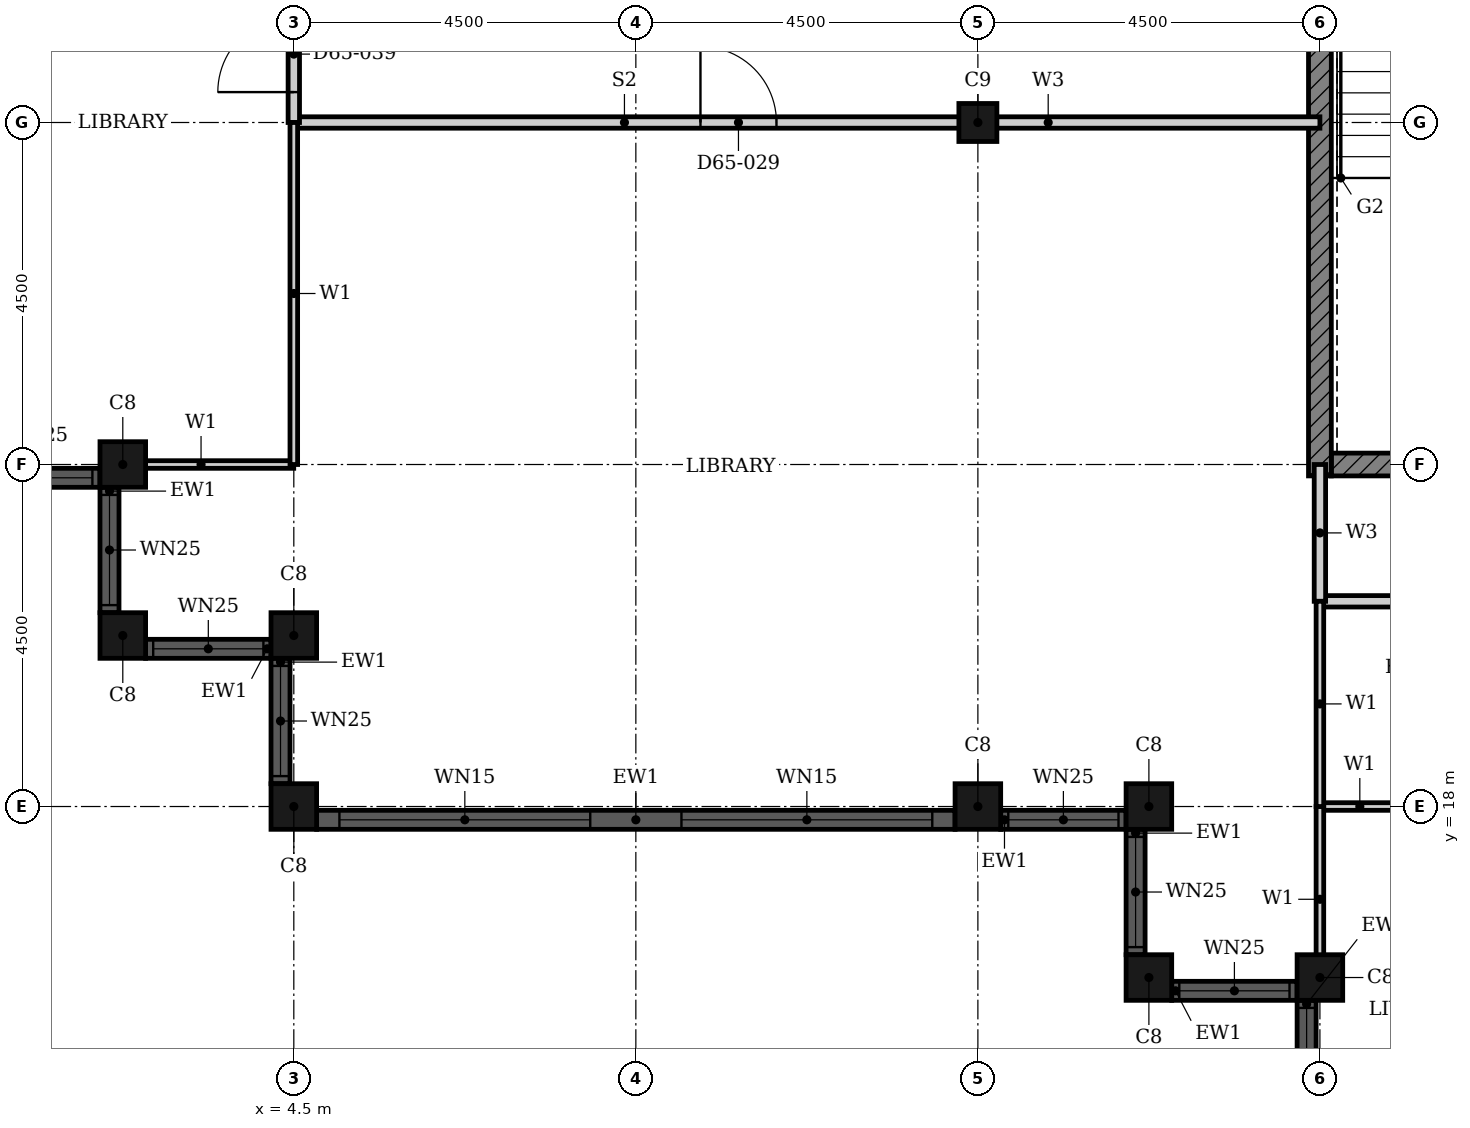
"""IFC4 building model, lengths in metres.
Left out: names, types, materials, properties, quantities, classifications, styles, units other than length and angle.
Written with IfcOpenShell. Run it as: python <this file> out.ifc"""

import sys

from ifc_helpers import new_model, si_unit, direction, frame, frame_2d, origin, origin_2d, place, context, subcontext, project, spatial, rectangle, hollow_rectangle, extrude, element, fill, save


model = new_model("IFC4")
c1 = context("Model", 3, precision=1e-05, world=origin(), true_north=direction((0.0, 1.0)))
c2 = subcontext(c1, "Body", "Model", "MODEL_VIEW")
j1 = project(units=[si_unit("LENGTHUNIT", "METRE"), si_unit("PLANEANGLEUNIT", "RADIAN")], contexts=[c1])
p1 = place(None, origin())
s1 = spatial("IfcSite", under=j1, at=p1, CompositionType="ELEMENT")
p2 = place(p1, origin())
s2 = spatial("IfcBuilding", under=s1, at=p2, CompositionType="ELEMENT")
p3 = place(p2, frame((0.0, 0.0, 256.4)))
s3 = spatial("IfcBuildingStorey", under=s2, at=p3, CompositionType="ELEMENT", Elevation=256.4)
for number, where, z_axis, x_axis in (
    (1, (15.75, 18.0, 0.0), (0.0, 0.0, 1.0), (1.0, 0.0, 0.0)),
    (2, (15.75, 15.75, 0.0), (0.0, 0.0, 1.0), (1.0, 0.0, 0.0)),
    (3, (18.0, 15.75, 0.0), (0.0, 0.0, 1.0), (1.0, 0.0, 0.0)),
    (4, (2.25, 22.5, 0.0), (0.0, 0.0, 1.0), (1.0, 0.0, 0.0)),
    (5, (2.25, 20.25, 0.0), (0.0, 0.0, 1.0), (1.0, 0.0, 0.0)),
    (6, (4.5, 20.25, 0.0), (0.0, 0.0, 1.0), (1.0, 0.0, 0.0)),
    (7, (4.5, 18.0, 0.0), (0.0, 0.0, 1.0), (1.0, 0.0, 0.0)),
    (8, (13.5, 18.0, 0.0), (0.0, 0.0, 1.0), (1.0, 0.0, 0.0)),
):
    element("IfcColumn", number, at=place(p3, frame(where, z_axis=z_axis, x_axis=x_axis)), inside=s3, PredefinedType="COLUMN", context=c2, shape_type="SweptSolid", body=[
        extrude(hollow_rectangle(XDim=0.6, YDim=0.6, WallThickness=0.02, at=origin_2d()), origin(), (0.0, 0.0, 1.0), 3.7),
    ])
p4 = place(p3, frame((13.5, 27.0, 0.0), z_axis=(0.0, 0.0, 1.0), x_axis=(1.0, 0.0, 0.0)))
e9 = element("IfcColumn", 9, at=p4, inside=s3, PredefinedType="COLUMN", context=c2, shape_type="SweptSolid", body=[
    extrude(hollow_rectangle(XDim=0.5, YDim=0.5, WallThickness=0.016, InnerFilletRadius=0.032, OuterFilletRadius=0.048, at=origin_2d()), origin(), (0.0, 0.0, 1.0), 3.7),
])
p5 = place(p3, frame((15.575, 17.7, 0.0), z_axis=(0.0, 0.0, 1.0), x_axis=(0.0, -1.0, 0.0)))
e10 = element("IfcWall", 10, at=p5, inside=s3, PredefinedType="SOLIDWALL", context=c2, shape_type="SweptSolid", body=[
    extrude(rectangle(XDim=1.65, YDim=0.25, at=frame_2d((0.825, 0.0))), origin(), (0.0, 0.0, 1.0), 3.7),
])
p6 = place(p5, frame((0.1, 0.0, 0.9)))
e11 = element("IfcOpeningElement", 11, at=p6, cuts=e10, PredefinedType="OPENING", context=c2, shape_type="SweptSolid", body=[
    extrude(rectangle(XDim=1.45, YDim=1.85, at=frame_2d((0.725, 0.925))), frame((0.0, 0.135, 0.0), z_axis=(0.0, -1.0, 0.0), x_axis=(1.0, 0.0, 0.0)), (0.0, 0.0, 1.0), 0.27),
])
p7 = place(p3, frame((16.05, 15.575, 0.0), z_axis=(0.0, 0.0, 1.0), x_axis=(1.0, 0.0, 0.0)))
e12 = element("IfcWall", 12, at=p7, inside=s3, PredefinedType="SOLIDWALL", context=c2, shape_type="SweptSolid", body=[
    extrude(rectangle(XDim=1.65, YDim=0.25, at=frame_2d((0.825, 0.0))), origin(), (0.0, 0.0, 1.0), 3.7),
])
p8 = place(p7, frame((0.1, 0.0, 0.9)))
e13 = element("IfcOpeningElement", 13, at=p8, cuts=e12, PredefinedType="OPENING", context=c2, shape_type="SweptSolid", body=[
    extrude(rectangle(XDim=1.45, YDim=1.85, at=frame_2d((0.725, 0.925))), frame((0.0, 0.135, 0.0), z_axis=(0.0, -1.0, 0.0), x_axis=(1.0, 0.0, 0.0)), (0.0, 0.0, 1.0), 0.27),
])
p9 = place(p3, frame((17.825, 15.45, 0.0), z_axis=(0.0, 0.0, 1.0), x_axis=(0.0, -1.0, 0.0)))
e14 = element("IfcWall", 14, at=p9, inside=s3, PredefinedType="SOLIDWALL", context=c2, shape_type="SweptSolid", body=[
    extrude(rectangle(XDim=1.65, YDim=0.25, at=frame_2d((0.825, 0.0))), origin(), (0.0, 0.0, 1.0), 3.7),
])
p10 = place(p9, frame((0.1, 0.0, 0.9)))
e15 = element("IfcOpeningElement", 15, at=p10, cuts=e14, PredefinedType="OPENING", context=c2, shape_type="SweptSolid", body=[
    extrude(rectangle(XDim=1.45, YDim=1.85, at=frame_2d((0.725, 0.925))), frame((0.0, 0.135, 0.0), z_axis=(0.0, -1.0, 0.0), x_axis=(1.0, 0.0, 0.0)), (0.0, 0.0, 1.0), 0.27),
])
p11 = place(p3, frame((0.3, 22.325, 0.0), z_axis=(0.0, 0.0, 1.0), x_axis=(1.0, 0.0, 0.0)))
e16 = element("IfcWall", 16, at=p11, inside=s3, PredefinedType="SOLIDWALL", context=c2, shape_type="SweptSolid", body=[
    extrude(rectangle(XDim=1.65, YDim=0.25, at=frame_2d((0.825, 0.0))), origin(), (0.0, 0.0, 1.0), 3.7),
])
p12 = place(p11, frame((0.1, 0.0, 0.9)))
e17 = element("IfcOpeningElement", 17, at=p12, cuts=e16, PredefinedType="OPENING", context=c2, shape_type="SweptSolid", body=[
    extrude(rectangle(XDim=1.45, YDim=1.85, at=frame_2d((0.725, 0.925))), frame((0.0, 0.135, 0.0), z_axis=(0.0, -1.0, 0.0), x_axis=(1.0, 0.0, 0.0)), (0.0, 0.0, 1.0), 0.27),
])
p13 = place(p3, frame((2.075, 22.2, 0.0), z_axis=(0.0, 0.0, 1.0), x_axis=(0.0, -1.0, 0.0)))
e18 = element("IfcWall", 18, at=p13, inside=s3, PredefinedType="SOLIDWALL", context=c2, shape_type="SweptSolid", body=[
    extrude(rectangle(XDim=1.65, YDim=0.25, at=frame_2d((0.825, 0.0))), origin(), (0.0, 0.0, 1.0), 3.7),
])
p14 = place(p13, frame((0.1, 0.0, 0.9)))
e19 = element("IfcOpeningElement", 19, at=p14, cuts=e18, PredefinedType="OPENING", context=c2, shape_type="SweptSolid", body=[
    extrude(rectangle(XDim=1.45, YDim=1.85, at=frame_2d((0.725, 0.925))), frame((0.0, 0.135, 0.0), z_axis=(0.0, -1.0, 0.0), x_axis=(1.0, 0.0, 0.0)), (0.0, 0.0, 1.0), 0.27),
])
p15 = place(p3, frame((2.55, 20.075, 0.0), z_axis=(0.0, 0.0, 1.0), x_axis=(1.0, 0.0, 0.0)))
e20 = element("IfcWall", 20, at=p15, inside=s3, PredefinedType="SOLIDWALL", context=c2, shape_type="SweptSolid", body=[
    extrude(rectangle(XDim=1.65, YDim=0.25, at=frame_2d((0.825, 0.0))), origin(), (0.0, 0.0, 1.0), 3.7),
])
p16 = place(p15, frame((0.1, 0.0, 0.9)))
e21 = element("IfcOpeningElement", 21, at=p16, cuts=e20, PredefinedType="OPENING", context=c2, shape_type="SweptSolid", body=[
    extrude(rectangle(XDim=1.45, YDim=1.85, at=frame_2d((0.725, 0.925))), frame((0.0, 0.135, 0.0), z_axis=(0.0, -1.0, 0.0), x_axis=(1.0, 0.0, 0.0)), (0.0, 0.0, 1.0), 0.27),
])
p17 = place(p3, frame((4.325, 19.95, 0.0), z_axis=(0.0, 0.0, 1.0), x_axis=(0.0, -1.0, 0.0)))
e22 = element("IfcWall", 22, at=p17, inside=s3, PredefinedType="SOLIDWALL", context=c2, shape_type="SweptSolid", body=[
    extrude(rectangle(XDim=1.65, YDim=0.25, at=frame_2d((0.825, 0.0))), origin(), (0.0, 0.0, 1.0), 3.7),
])
p18 = place(p17, frame((0.1, 0.0, 0.9)))
e23 = element("IfcOpeningElement", 23, at=p18, cuts=e22, PredefinedType="OPENING", context=c2, shape_type="SweptSolid", body=[
    extrude(rectangle(XDim=1.45, YDim=1.85, at=frame_2d((0.725, 0.925))), frame((0.0, 0.135, 0.0), z_axis=(0.0, -1.0, 0.0), x_axis=(1.0, 0.0, 0.0)), (0.0, 0.0, 1.0), 0.27),
])
p19 = place(p3, frame((4.8, 17.825, 0.0), z_axis=(0.0, 0.0, 1.0), x_axis=(1.0, 0.0, 0.0)))
e24 = element("IfcWall", 24, at=p19, inside=s3, PredefinedType="SOLIDWALL", context=c2, shape_type="SweptSolid", body=[
    extrude(rectangle(XDim=8.4, YDim=0.25, at=frame_2d((4.2, 0.0))), origin(), (0.0, 0.0, 1.0), 3.7),
])
p20 = place(p19, frame((0.3, 0.0, 0.45)))
e25 = element("IfcOpeningElement", 25, at=p20, cuts=e24, PredefinedType="OPENING", context=c2, shape_type="SweptSolid", body=[
    extrude(rectangle(XDim=3.3, YDim=2.3, at=frame_2d((1.65, 1.15))), frame((0.0, 0.135, 0.0), z_axis=(0.0, -1.0, 0.0), x_axis=(1.0, 0.0, 0.0)), (0.0, 0.0, 1.0), 0.27),
])
p21 = place(p19, frame((4.8, 0.0, 0.45)))
e26 = element("IfcOpeningElement", 26, at=p21, cuts=e24, PredefinedType="OPENING", context=c2, shape_type="SweptSolid", body=[
    extrude(rectangle(XDim=3.3, YDim=2.3, at=frame_2d((1.65, 1.15))), frame((0.0, 0.135, 0.0), z_axis=(0.0, -1.0, 0.0), x_axis=(1.0, 0.0, 0.0)), (0.0, 0.0, 1.0), 0.27),
])
p22 = place(p3, frame((13.8, 17.825, 0.0), z_axis=(0.0, 0.0, 1.0), x_axis=(1.0, 0.0, 0.0)))
e27 = element("IfcWall", 27, at=p22, inside=s3, PredefinedType="SOLIDWALL", context=c2, shape_type="SweptSolid", body=[
    extrude(rectangle(XDim=1.65, YDim=0.25, at=frame_2d((0.825, 0.0))), origin(), (0.0, 0.0, 1.0), 3.7),
])
p23 = place(p22, frame((0.1, 0.0, 0.9)))
e28 = element("IfcOpeningElement", 28, at=p23, cuts=e27, PredefinedType="OPENING", context=c2, shape_type="SweptSolid", body=[
    extrude(rectangle(XDim=1.45, YDim=1.85, at=frame_2d((0.725, 0.925))), frame((0.0, 0.135, 0.0), z_axis=(0.0, -1.0, 0.0), x_axis=(1.0, 0.0, 0.0)), (0.0, 0.0, 1.0), 0.27),
])
p24 = place(p3, frame((18.15, 22.5, 0.0), z_axis=(0.0, 0.0, 1.0), x_axis=(1.0, 0.0, 0.0)))
e29 = element("IfcWall", 29, at=p24, inside=s3, PredefinedType="SHEAR", context=c2, shape_type="SweptSolid", body=[
    extrude(rectangle(XDim=4.225, YDim=0.3, at=frame_2d((2.113, 0.0))), origin(), (0.0, 0.0, 1.0), 3.4),
])
p25 = place(p3, frame((18.0, 22.35, 0.0), z_axis=(0.0, 0.0, 1.0), x_axis=(0.0, 1.0, 0.0)))
e30 = element("IfcWall", 30, at=p25, inside=s3, PredefinedType="SHEAR", context=c2, shape_type="SweptSolid", body=[
    extrude(rectangle(XDim=9.3, YDim=0.3, at=frame_2d((4.65, 0.0))), origin(), (0.0, 0.0, 1.0), 3.4),
])
p26 = place(p3, frame((18.0, 20.7, 0.0), z_axis=(0.0, 0.0, 1.0), x_axis=(1.0, 0.0, 0.0)))
e31 = element("IfcWall", 31, at=p26, inside=s3, PredefinedType="PARTITIONING", context=c2, shape_type="SweptSolid", body=[
    extrude(rectangle(XDim=6.6, YDim=0.15, at=frame_2d((3.3, 0.0))), origin(), (0.0, 0.0, 1.0), 3.4),
])
p27 = place(p26, frame((4.3, 0.0, 0.0)))
e32 = element("IfcOpeningElement", 32, at=p27, cuts=e31, PredefinedType="OPENING", context=c2, shape_type="SweptSolid", body=[
    extrude(rectangle(XDim=1.0, YDim=2.2, at=frame_2d((0.5, 1.1))), frame((0.0, 0.085, 0.0), z_axis=(0.0, -1.0, 0.0), x_axis=(1.0, 0.0, 0.0)), (0.0, 0.0, 1.0), 0.17),
])
p28 = place(p3, frame((4.5, 27.0, 0.0), z_axis=(0.0, 0.0, 1.0), x_axis=(1.0, 0.0, 0.0)))
e33 = element("IfcWall", 33, at=p28, inside=s3, PredefinedType="PARTITIONING", context=c2, shape_type="SweptSolid", body=[
    extrude(rectangle(XDim=13.5, YDim=0.15, at=frame_2d((6.75, 0.0))), origin(), (0.0, 0.0, 1.0), 2.68),
])
p29 = place(p28, frame((5.35, 0.0, 0.0)))
e34 = element("IfcOpeningElement", 34, at=p29, cuts=e33, PredefinedType="OPENING", context=c2, shape_type="SweptSolid", body=[
    extrude(rectangle(XDim=1.0, YDim=2.1, at=frame_2d((0.5, 1.05))), frame((0.0, 0.085, 0.0), z_axis=(0.0, -1.0, 0.0), x_axis=(1.0, 0.0, 0.0)), (0.0, 0.0, 1.0), 0.17),
])
p30 = place(p3, frame((18.0, 20.7, 0.0), z_axis=(0.0, 0.0, 1.0), x_axis=(0.0, 1.0, 0.0)))
e35 = element("IfcWall", 35, at=p30, inside=s3, PredefinedType="PARTITIONING", context=c2, shape_type="SweptSolid", body=[
    extrude(rectangle(XDim=1.8, YDim=0.15, at=frame_2d((0.9, 0.0))), origin(), (0.0, 0.0, 1.0), 3.4),
])
p31 = place(p3, frame((4.5, 27.0, 0.0), z_axis=(0.0, 0.0, 1.0), x_axis=(0.0, 1.0, 0.0)))
e36 = element("IfcWall", 36, at=p31, inside=s3, PredefinedType="PARTITIONING", context=c2, shape_type="SweptSolid", body=[
    extrude(rectangle(XDim=1.8, YDim=0.15, at=frame_2d((0.9, 0.0))), origin(), (0.0, 0.0, 1.0), 3.4),
])
p32 = place(p31, frame((0.4, 0.0, 0.0)))
e37 = element("IfcOpeningElement", 37, at=p32, cuts=e36, PredefinedType="OPENING", context=c2, shape_type="SweptSolid", body=[
    extrude(rectangle(XDim=1.0, YDim=2.1, at=frame_2d((0.5, 1.05))), frame((0.0, 0.085, 0.0), z_axis=(0.0, -1.0, 0.0), x_axis=(1.0, 0.0, 0.0)), (0.0, 0.0, 1.0), 0.17),
])
p33 = place(p3, frame((18.0, 18.0, 0.0), z_axis=(0.0, 0.0, 1.0), x_axis=(1.0, 0.0, 0.0)))
e38 = element("IfcWall", 38, at=p33, inside=s3, PredefinedType="PARTITIONING", context=c2, shape_type="SweptSolid", body=[
    extrude(rectangle(XDim=3.0, YDim=0.1, at=frame_2d((1.5, 0.0))), origin(), (0.0, 0.0, 1.0), 3.4),
])
p34 = place(p33, frame((1.05, 0.0, 0.0)))
e39 = element("IfcOpeningElement", 39, at=p34, cuts=e38, PredefinedType="OPENING", context=c2, shape_type="SweptSolid", body=[
    extrude(rectangle(XDim=0.9, YDim=2.1, at=frame_2d((0.45, 1.05))), frame((0.0, 0.06, 0.0), z_axis=(0.0, -1.0, 0.0), x_axis=(1.0, 0.0, 0.0)), (0.0, 0.0, 1.0), 0.12),
])
p35 = place(p3, frame((2.06, 22.5, 0.0), z_axis=(0.0, 0.0, 1.0), x_axis=(1.0, 0.0, 0.0)))
e40 = element("IfcWall", 40, at=p35, inside=s3, PredefinedType="PARTITIONING", context=c2, shape_type="SweptSolid", body=[
    extrude(rectangle(XDim=2.439, YDim=0.1, at=frame_2d((1.219, 0.0))), origin(), (0.0, 0.0, 1.0), 2.68),
])
p36 = place(p3, frame((18.0, 15.56, 0.0), z_axis=(0.0, 0.0, 1.0), x_axis=(0.0, 1.0, 0.0)))
e41 = element("IfcWall", 41, at=p36, inside=s3, PredefinedType="PARTITIONING", context=c2, shape_type="SweptSolid", body=[
    extrude(rectangle(XDim=2.439, YDim=0.1, at=frame_2d((1.219, 0.0))), origin(), (0.0, 0.0, 1.0), 3.4),
])
p37 = place(p3, frame((18.0, 18.0, 0.0), z_axis=(0.0, 0.0, 1.0), x_axis=(0.0, 1.0, 0.0)))
e42 = element("IfcWall", 42, at=p37, inside=s3, PredefinedType="PARTITIONING", context=c2, shape_type="SweptSolid", body=[
    extrude(rectangle(XDim=2.7, YDim=0.1, at=frame_2d((1.35, 0.0))), origin(), (0.0, 0.0, 1.0), 3.4),
])
p38 = place(p3, frame((4.5, 22.5, 0.0), z_axis=(0.0, 0.0, 1.0), x_axis=(0.0, 1.0, 0.0)))
e43 = element("IfcWall", 43, at=p38, inside=s3, PredefinedType="PARTITIONING", context=c2, shape_type="SweptSolid", body=[
    extrude(rectangle(XDim=4.5, YDim=0.1, at=frame_2d((2.25, 0.0))), origin(), (0.0, 0.0, 1.0), 3.4),
])
p39 = place(p6, origin())
e44 = element("IfcWindow", 44, at=p39, inside=s3, PartitioningType="SINGLE_PANEL", PredefinedType="WINDOW", context=c2, shape_type="SweptSolid", body=[
    extrude(rectangle(XDim=1.45, YDim=1.85, at=frame_2d((0.725, 0.925))), frame((0.0, 0.03, 0.0), z_axis=(0.0, -1.0, 0.0), x_axis=(1.0, 0.0, 0.0)), (0.0, 0.0, 1.0), 0.06),
])
fill(e11, e44)
p40 = place(p8, origin())
e45 = element("IfcWindow", 45, at=p40, inside=s3, PartitioningType="SINGLE_PANEL", PredefinedType="WINDOW", context=c2, shape_type="SweptSolid", body=[
    extrude(rectangle(XDim=1.45, YDim=1.85, at=frame_2d((0.725, 0.925))), frame((0.0, 0.03, 0.0), z_axis=(0.0, -1.0, 0.0), x_axis=(1.0, 0.0, 0.0)), (0.0, 0.0, 1.0), 0.06),
])
fill(e13, e45)
p41 = place(p10, origin())
e46 = element("IfcWindow", 46, at=p41, inside=s3, PartitioningType="SINGLE_PANEL", PredefinedType="WINDOW", context=c2, shape_type="SweptSolid", body=[
    extrude(rectangle(XDim=1.45, YDim=1.85, at=frame_2d((0.725, 0.925))), frame((0.0, 0.03, 0.0), z_axis=(0.0, -1.0, 0.0), x_axis=(1.0, 0.0, 0.0)), (0.0, 0.0, 1.0), 0.06),
])
fill(e15, e46)
p42 = place(p12, origin())
e47 = element("IfcWindow", 47, at=p42, inside=s3, PartitioningType="SINGLE_PANEL", PredefinedType="WINDOW", context=c2, shape_type="SweptSolid", body=[
    extrude(rectangle(XDim=1.45, YDim=1.85, at=frame_2d((0.725, 0.925))), frame((0.0, 0.03, 0.0), z_axis=(0.0, -1.0, 0.0), x_axis=(1.0, 0.0, 0.0)), (0.0, 0.0, 1.0), 0.06),
])
fill(e17, e47)
p43 = place(p14, origin())
e48 = element("IfcWindow", 48, at=p43, inside=s3, PartitioningType="SINGLE_PANEL", PredefinedType="WINDOW", context=c2, shape_type="SweptSolid", body=[
    extrude(rectangle(XDim=1.45, YDim=1.85, at=frame_2d((0.725, 0.925))), frame((0.0, 0.03, 0.0), z_axis=(0.0, -1.0, 0.0), x_axis=(1.0, 0.0, 0.0)), (0.0, 0.0, 1.0), 0.06),
])
fill(e19, e48)
p44 = place(p16, origin())
e49 = element("IfcWindow", 49, at=p44, inside=s3, PartitioningType="SINGLE_PANEL", PredefinedType="WINDOW", context=c2, shape_type="SweptSolid", body=[
    extrude(rectangle(XDim=1.45, YDim=1.85, at=frame_2d((0.725, 0.925))), frame((0.0, 0.03, 0.0), z_axis=(0.0, -1.0, 0.0), x_axis=(1.0, 0.0, 0.0)), (0.0, 0.0, 1.0), 0.06),
])
fill(e21, e49)
p45 = place(p18, origin())
e50 = element("IfcWindow", 50, at=p45, inside=s3, PartitioningType="SINGLE_PANEL", PredefinedType="WINDOW", context=c2, shape_type="SweptSolid", body=[
    extrude(rectangle(XDim=1.45, YDim=1.85, at=frame_2d((0.725, 0.925))), frame((0.0, 0.03, 0.0), z_axis=(0.0, -1.0, 0.0), x_axis=(1.0, 0.0, 0.0)), (0.0, 0.0, 1.0), 0.06),
])
fill(e23, e50)
p46 = place(p20, origin())
e51 = element("IfcWindow", 51, at=p46, inside=s3, PartitioningType="SINGLE_PANEL", PredefinedType="WINDOW", context=c2, shape_type="SweptSolid", body=[
    extrude(rectangle(XDim=3.3, YDim=2.3, at=frame_2d((1.65, 1.15))), frame((0.0, 0.03, 0.0), z_axis=(0.0, -1.0, 0.0), x_axis=(1.0, 0.0, 0.0)), (0.0, 0.0, 1.0), 0.06),
])
fill(e25, e51)
p47 = place(p21, origin())
e52 = element("IfcWindow", 52, at=p47, inside=s3, PartitioningType="SINGLE_PANEL", PredefinedType="WINDOW", context=c2, shape_type="SweptSolid", body=[
    extrude(rectangle(XDim=3.3, YDim=2.3, at=frame_2d((1.65, 1.15))), frame((0.0, 0.03, 0.0), z_axis=(0.0, -1.0, 0.0), x_axis=(1.0, 0.0, 0.0)), (0.0, 0.0, 1.0), 0.06),
])
fill(e26, e52)
p48 = place(p23, origin())
e53 = element("IfcWindow", 53, at=p48, inside=s3, PartitioningType="SINGLE_PANEL", PredefinedType="WINDOW", context=c2, shape_type="SweptSolid", body=[
    extrude(rectangle(XDim=1.45, YDim=1.85, at=frame_2d((0.725, 0.925))), frame((0.0, 0.03, 0.0), z_axis=(0.0, -1.0, 0.0), x_axis=(1.0, 0.0, 0.0)), (0.0, 0.0, 1.0), 0.06),
])
fill(e28, e53)
p49 = place(p29, origin())
e54 = element("IfcDoor", 54, at=p49, inside=s3, OperationType="SINGLE_SWING_LEFT", PredefinedType="DOOR", context=c2, shape_type="SweptSolid", body=[
    extrude(rectangle(XDim=1.0, YDim=2.1, at=frame_2d((0.5, 1.05))), frame((0.0, 0.025, 0.0), z_axis=(0.0, -1.0, 0.0), x_axis=(1.0, 0.0, 0.0)), (0.0, 0.0, 1.0), 0.05),
])
fill(e34, e54)
p50 = place(p32, origin())
e55 = element("IfcDoor", 55, at=p50, inside=s3, OperationType="SINGLE_SWING_LEFT", PredefinedType="DOOR", context=c2, shape_type="SweptSolid", body=[
    extrude(rectangle(XDim=1.0, YDim=2.1, at=frame_2d((0.5, 1.05))), frame((0.0, 0.025, 0.0), z_axis=(0.0, -1.0, 0.0), x_axis=(1.0, 0.0, 0.0)), (0.0, 0.0, 1.0), 0.05),
])
fill(e37, e55)
save(model, sys.argv[1])
